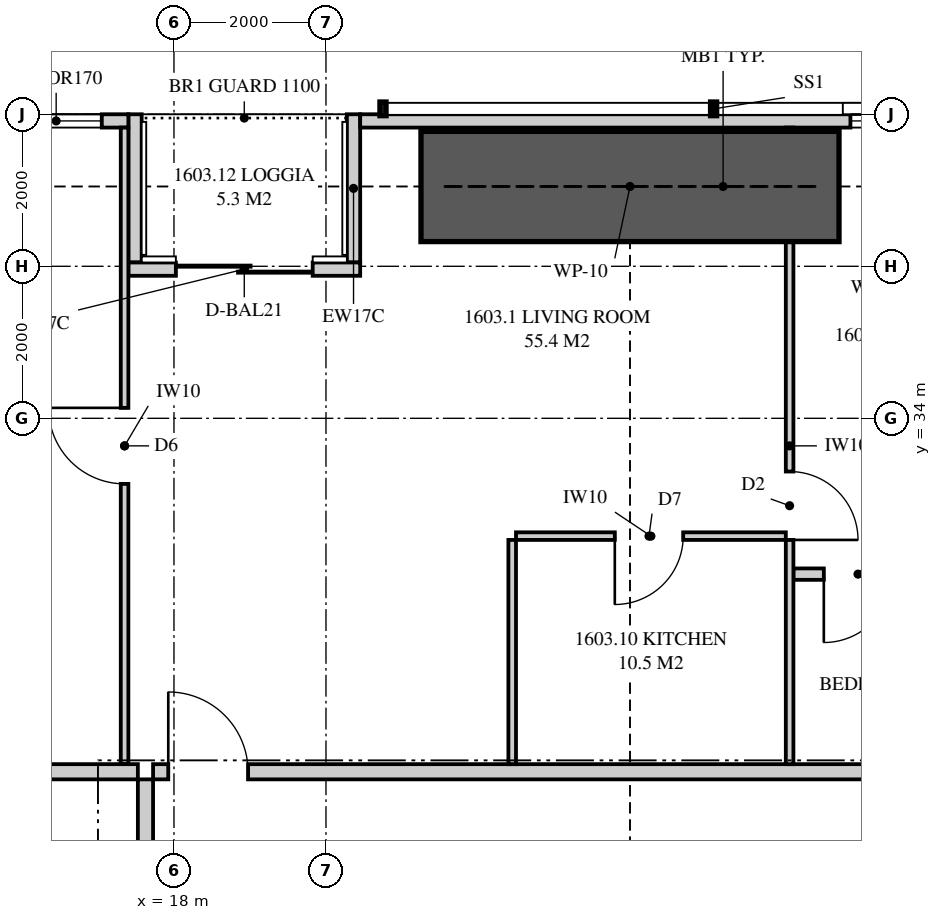
"""IFC4 building model, lengths in metres.
Left out: names, types, materials, properties, quantities, classifications, styles, units other than length and angle.
Written with IfcOpenShell. Run it as: python <this file> out.ifc"""

import sys

from ifc_helpers import new_model, si_unit, direction, frame, frame_2d, origin, place, context, subcontext, project, spatial, polyline, rectangle, outline, extrude, element, fill, save


model = new_model("IFC4")
c1 = context("Model", 3, precision=1e-05, world=origin(), true_north=direction((0.0, 1.0)))
c2 = subcontext(c1, "Body", "Model", "MODEL_VIEW")
j1 = project(units=[si_unit("LENGTHUNIT", "METRE"), si_unit("PLANEANGLEUNIT", "RADIAN")], contexts=[c1])
p1 = place(None, origin())
s1 = spatial("IfcSite", under=j1, at=p1, CompositionType="ELEMENT")
p2 = place(p1, origin())
s2 = spatial("IfcBuilding", under=s1, at=p2, CompositionType="ELEMENT")
p3 = place(p2, frame((0.0, 0.0, 61.2)))
s3 = spatial("IfcBuildingStorey", under=s2, at=p3, CompositionType="ELEMENT", Elevation=61.2)
p4 = place(p3, frame((37.824, 37.913, 0.0), z_axis=(0.0, 0.0, 1.0), x_axis=(-1.0, 0.0, 0.0)))
e1 = element("IfcWall", 1, at=p4, inside=s3, PredefinedType="SOLIDWALL", context=c2, shape_type="SweptSolid", body=[
    extrude(outline(polyline([(0.0, 0.0), (17.374, 0.0), (17.374, 2.15), (2.824, 2.15), (2.824, 3.11), (2.668, 3.11), (2.668, 2.15), (2.62, 2.15), (2.62, 3.11), (0.0, 3.11), (0.0, 0.0)])), frame((0.0, 0.087, 0.0), z_axis=(0.0, -1.0, 0.0), x_axis=(1.0, 0.0, 0.0)), (0.0, 0.0, 1.0), 0.175),
])
p5 = place(p4, frame((5.699, 0.0, 0.4)))
e2 = element("IfcOpeningElement", 2, at=p5, cuts=e1, PredefinedType="OPENING", context=c2, shape_type="SweptSolid", body=[
    extrude(rectangle(XDim=1.8, YDim=1.7, at=frame_2d((0.9, 0.85))), frame((0.0, 0.097, 0.0), z_axis=(0.0, -1.0, 0.0), x_axis=(1.0, 0.0, 0.0)), (0.0, 0.0, 1.0), 0.195),
])
p6 = place(p4, frame((9.124, 0.0, 0.4)))
e3 = element("IfcOpeningElement", 3, at=p6, cuts=e1, PredefinedType="OPENING", context=c2, shape_type="SweptSolid", body=[
    extrude(rectangle(XDim=1.8, YDim=1.7, at=frame_2d((0.9, 0.85))), frame((0.0, 0.097, 0.0), z_axis=(0.0, -1.0, 0.0), x_axis=(1.0, 0.0, 0.0)), (0.0, 0.0, 1.0), 0.195),
])
p7 = place(p3, frame((17.4, 37.913, 0.0), z_axis=(0.0, 0.0, 1.0), x_axis=(-1.0, 0.0, 0.0)))
e4 = element("IfcWall", 4, at=p7, inside=s3, PredefinedType="SOLIDWALL", context=c2, shape_type="SweptSolid", body=[
    extrude(outline(polyline([(0.0, 0.0), (12.349, 0.0), (12.349, 3.11), (4.604, 3.11), (4.604, 2.15), (4.556, 2.15), (4.556, 3.11), (4.4, 3.11), (4.4, 2.15), (0.0, 2.15), (0.0, 0.0)])), frame((0.0, 0.087, 0.0), z_axis=(0.0, -1.0, 0.0), x_axis=(1.0, 0.0, 0.0)), (0.0, 0.0, 1.0), 0.175),
])
p8 = place(p7, frame((0.35, 0.0, 0.4)))
e5 = element("IfcOpeningElement", 5, at=p8, cuts=e4, PredefinedType="OPENING", context=c2, shape_type="SweptSolid", body=[
    extrude(rectangle(XDim=1.2, YDim=1.7, at=frame_2d((0.6, 0.85))), frame((0.0, 0.097, 0.0), z_axis=(0.0, -1.0, 0.0), x_axis=(1.0, 0.0, 0.0)), (0.0, 0.0, 1.0), 0.195),
])
p9 = place(p7, frame((8.3, 0.0, 0.4)))
e6 = element("IfcOpeningElement", 6, at=p9, cuts=e4, PredefinedType="OPENING", context=c2, shape_type="SweptSolid", body=[
    extrude(rectangle(XDim=1.8, YDim=1.7, at=frame_2d((0.9, 0.85))), frame((0.0, 0.097, 0.0), z_axis=(0.0, -1.0, 0.0), x_axis=(1.0, 0.0, 0.0)), (0.0, 0.0, 1.0), 0.195),
])
p10 = place(p3, frame((20.45, 35.962, 0.0), z_axis=(0.0, 0.0, 1.0), x_axis=(-1.0, 0.0, 0.0)))
e7 = element("IfcWall", 7, at=p10, inside=s3, PredefinedType="SOLIDWALL", context=c2, shape_type="SweptSolid", body=[
    extrude(rectangle(XDim=3.05, YDim=0.175, at=frame_2d((1.525, 0.0))), origin(), (0.0, 0.0, 1.0), 3.11),
])
p11 = place(p10, frame((0.625, 0.0, 0.0)))
e8 = element("IfcOpeningElement", 8, at=p11, cuts=e7, PredefinedType="OPENING", context=c2, shape_type="SweptSolid", body=[
    extrude(rectangle(XDim=1.8, YDim=2.1, at=frame_2d((0.9, 1.05))), frame((0.0, 0.097, 0.0), z_axis=(0.0, -1.0, 0.0), x_axis=(1.0, 0.0, 0.0)), (0.0, 0.0, 1.0), 0.195),
])
for number, where, z_axis, x_axis in (
    (9, (20.363, 38.0, 0.0), (0.0, 0.0, 1.0), (0.0, -1.0, 0.0)),
    (10, (17.488, 38.0, 0.0), (0.0, 0.0, 1.0), (0.0, -1.0, 0.0)),
):
    element("IfcWall", number, at=place(p3, frame(where, z_axis=z_axis, x_axis=x_axis)), inside=s3, PredefinedType="SOLIDWALL", context=c2, shape_type="SweptSolid", body=[
        extrude(outline(polyline([(0.0, 0.0), (1.95, 0.0), (1.95, 3.11), (1.75, 3.11), (1.75, 2.15), (0.15, 2.15), (0.15, 3.11), (0.0, 3.11), (0.0, 0.0)])), frame((0.0, 0.087, 0.0), z_axis=(0.0, -1.0, 0.0), x_axis=(1.0, 0.0, 0.0)), (0.0, 0.0, 1.0), 0.175),
    ])
p12 = place(p3, frame((17.725, 29.35, 0.0), z_axis=(0.0, 0.0, 1.0), x_axis=(1.0, 0.0, 0.0)))
e11 = element("IfcWall", 11, at=p12, inside=s3, PredefinedType="PARTITIONING", context=c2, shape_type="SweptSolid", body=[
    extrude(outline(polyline([(0.0, 0.0), (15.275, 0.0), (15.275, 3.11), (6.612, 3.11), (6.612, 2.541), (5.938, 2.541), (5.938, 3.11), (0.0, 3.11), (0.0, 0.0)])), frame((0.0, 0.1, 0.0), z_axis=(0.0, -1.0, 0.0), x_axis=(1.0, 0.0, 0.0)), (0.0, 0.0, 1.0), 0.2),
])
p13 = place(p12, frame((0.2, 0.0, 0.0)))
e12 = element("IfcOpeningElement", 12, at=p13, cuts=e11, PredefinedType="OPENING", context=c2, shape_type="SweptSolid", body=[
    extrude(rectangle(XDim=1.05, YDim=2.2, at=frame_2d((0.525, 1.1))), frame((0.0, 0.11, 0.0), z_axis=(0.0, -1.0, 0.0), x_axis=(1.0, 0.0, 0.0)), (0.0, 0.0, 1.0), 0.22),
])
p14 = place(p3, frame((26.1, 37.825, 0.0), z_axis=(0.0, 0.0, 1.0), x_axis=(0.0, -1.0, 0.0)))
e13 = element("IfcWall", 13, at=p14, inside=s3, PredefinedType="PARTITIONING", context=c2, shape_type="SweptSolid", body=[
    extrude(outline(polyline([(0.529, 2.15), (0.0, 2.15), (0.0, 0.0), (0.529, 0.0), (0.529, 0.034), (1.021, 0.034), (1.021, 0.0), (8.375, 0.0), (8.375, 3.11), (1.635, 3.11), (1.635, 2.15), (1.021, 2.15), (1.021, 2.116), (0.529, 2.116), (0.529, 2.15)])), frame((0.0, 0.05, 0.0), z_axis=(0.0, -1.0, 0.0), x_axis=(1.0, 0.0, 0.0)), (0.0, 0.0, 1.0), 0.1),
])
p15 = place(p14, frame((4.525, 0.0, 0.0)))
e14 = element("IfcOpeningElement", 14, at=p15, cuts=e13, PredefinedType="OPENING", context=c2, shape_type="SweptSolid", body=[
    extrude(rectangle(XDim=0.9, YDim=2.1, at=frame_2d((0.45, 1.05))), frame((0.0, 0.06, 0.0), z_axis=(0.0, -1.0, 0.0), x_axis=(1.0, 0.0, 0.0)), (0.0, 0.0, 1.0), 0.12),
])
p16 = place(p3, frame((26.15, 31.95, 0.0), z_axis=(0.0, 0.0, 1.0), x_axis=(1.0, 0.0, 0.0)))
e15 = element("IfcWall", 15, at=p16, inside=s3, PredefinedType="PLUMBINGWALL", context=c2, shape_type="SweptSolid", body=[
    extrude(rectangle(XDim=3.3, YDim=0.15, at=frame_2d((1.65, 0.0))), origin(), (0.0, 0.0, 1.0), 3.11),
])
p17 = place(p16, frame((0.4, 0.0, 0.0)))
e16 = element("IfcOpeningElement", 16, at=p17, cuts=e15, PredefinedType="OPENING", context=c2, shape_type="SweptSolid", body=[
    extrude(rectangle(XDim=0.9, YDim=2.1, at=frame_2d((0.45, 1.05))), frame((0.0, 0.085, 0.0), z_axis=(0.0, -1.0, 0.0), x_axis=(1.0, 0.0, 0.0)), (0.0, 0.0, 1.0), 0.17),
])
p18 = place(p3, frame((22.5, 32.45, 0.0), z_axis=(0.0, 0.0, 1.0), x_axis=(1.0, 0.0, 0.0)))
e17 = element("IfcWall", 17, at=p18, inside=s3, PredefinedType="PARTITIONING", context=c2, shape_type="SweptSolid", body=[
    extrude(outline(polyline([(0.0, 0.0), (3.55, 0.0), (3.55, 3.11), (1.787, 3.11), (1.787, 2.541), (1.213, 2.541), (1.213, 3.11), (0.0, 3.11), (0.0, 0.0)])), frame((0.0, 0.05, 0.0), z_axis=(0.0, -1.0, 0.0), x_axis=(1.0, 0.0, 0.0)), (0.0, 0.0, 1.0), 0.1),
])
p19 = place(p18, frame((1.3, 0.0, 0.0)))
e18 = element("IfcOpeningElement", 18, at=p19, cuts=e17, PredefinedType="OPENING", context=c2, shape_type="SweptSolid", body=[
    extrude(rectangle(XDim=0.9, YDim=2.1, at=frame_2d((0.45, 1.05))), frame((0.0, 0.06, 0.0), z_axis=(0.0, -1.0, 0.0), x_axis=(1.0, 0.0, 0.0)), (0.0, 0.0, 1.0), 0.12),
])
p20 = place(p3, frame((22.45, 32.4, 0.0), z_axis=(0.0, 0.0, 1.0), x_axis=(0.0, -1.0, 0.0)))
e19 = element("IfcWall", 19, at=p20, inside=s3, PredefinedType="PARTITIONING", context=c2, shape_type="SweptSolid", body=[
    extrude(rectangle(XDim=2.95, YDim=0.1, at=frame_2d((1.475, 0.0))), origin(), (0.0, 0.0, 1.0), 3.11),
])
p21 = place(p3, frame((17.35, 37.825, 0.0), z_axis=(0.0, 0.0, 1.0), x_axis=(0.0, -1.0, 0.0)))
e20 = element("IfcWall", 20, at=p21, inside=s3, PredefinedType="PARTITIONING", context=c2, shape_type="SweptSolid", body=[
    extrude(outline(polyline([(0.0, 0.0), (8.375, 0.0), (8.375, 3.11), (1.635, 3.11), (1.635, 2.15), (0.0, 2.15), (0.0, 3.11), (0.0, 0.0)])), frame((0.0, 0.05, 0.0), z_axis=(0.0, -1.0, 0.0), x_axis=(1.0, 0.0, 0.0)), (0.0, 0.0, 1.0), 0.1),
])
p22 = place(p21, frame((3.688, 0.0, 0.0)))
e21 = element("IfcOpeningElement", 21, at=p22, cuts=e20, PredefinedType="OPENING", context=c2, shape_type="SweptSolid", body=[
    extrude(rectangle(XDim=1.0, YDim=2.1, at=frame_2d((0.5, 1.05))), frame((0.0, 0.06, 0.0), z_axis=(0.0, -1.0, 0.0), x_axis=(1.0, 0.0, 0.0)), (0.0, 0.0, 1.0), 0.12),
])
p23 = place(p3, frame((2.0, 29.35, 0.0), z_axis=(0.0, 0.0, 1.0), x_axis=(1.0, 0.0, 0.0)))
e22 = element("IfcWall", 22, at=p23, inside=s3, PredefinedType="PARTITIONING", context=c2, shape_type="SweptSolid", body=[
    extrude(outline(polyline([(0.0, 0.0), (15.525, 0.0), (15.525, 3.11), (11.337, 3.11), (11.337, 2.541), (10.663, 2.541), (10.663, 3.11), (9.51, 3.11), (9.51, 2.51), (6.89, 2.51), (6.89, 3.11), (2.969, 3.11), (2.969, 2.541), (2.577, 2.541), (2.577, 2.15), (0.733, 2.15), (0.733, 3.11), (0.0, 3.11), (0.0, 0.0)])), frame((0.0, 0.1, 0.0), z_axis=(0.0, -1.0, 0.0), x_axis=(1.0, 0.0, 0.0)), (0.0, 0.0, 1.0), 0.2),
])
p24 = place(p3, frame((17.625, 24.2, 0.0), z_axis=(0.0, 0.0, 1.0), x_axis=(0.0, 1.0, 0.0)))
e23 = element("IfcWall", 23, at=p24, inside=s3, PredefinedType="PARTITIONING", context=c2, shape_type="SweptSolid", body=[
    extrude(outline(polyline([(0.0, 0.0), (5.05, 0.0), (5.05, 3.11), (1.137, 3.11), (1.137, 2.541), (0.463, 2.541), (0.463, 3.11), (0.0, 3.11), (0.0, 0.0)])), frame((0.0, 0.1, 0.0), z_axis=(0.0, -1.0, 0.0), x_axis=(1.0, 0.0, 0.0)), (0.0, 0.0, 1.0), 0.2),
])
p25 = place(p24, frame((1.075, 0.0, 0.0)))
e24 = element("IfcOpeningElement", 24, at=p25, cuts=e23, PredefinedType="OPENING", context=c2, shape_type="SweptSolid", body=[
    extrude(rectangle(XDim=1.8, YDim=2.1, at=frame_2d((0.9, 1.05))), frame((0.0, 0.11, 0.0), z_axis=(0.0, -1.0, 0.0), x_axis=(1.0, 0.0, 0.0)), (0.0, 0.0, 1.0), 0.22),
])
p26 = place(p3, frame((21.25, 37.05, 0.0), z_axis=(0.0, 0.0, 1.0), x_axis=(1.0, 0.0, 0.0)))
e25 = element("IfcWall", 25, at=p26, inside=s3, PredefinedType="SHEAR", context=c2, shape_type="SweptSolid", body=[
    extrude(rectangle(XDim=5.5, YDim=1.45, at=frame_2d((2.75, 0.0))), origin(), (0.0, 0.0, 1.0), 3.35),
])
p27 = place(p6, origin())
e26 = element("IfcWindow", 26, at=p27, inside=s3, PartitioningType="SINGLE_PANEL", PredefinedType="WINDOW", context=c2, shape_type="SweptSolid", body=[
    extrude(rectangle(XDim=1.8, YDim=1.7, at=frame_2d((0.9, 0.85))), frame((0.0, 0.03, 0.0), z_axis=(0.0, -1.0, 0.0), x_axis=(1.0, 0.0, 0.0)), (0.0, 0.0, 1.0), 0.06),
])
fill(e3, e26)
p28 = place(p11, origin())
e27 = element("IfcDoor", 27, at=p28, inside=s3, OperationType="SLIDING_TO_LEFT", PredefinedType="DOOR", context=c2, shape_type="SweptSolid", body=[
    extrude(rectangle(XDim=1.8, YDim=2.1, at=frame_2d((0.9, 1.05))), frame((0.0, 0.025, 0.0), z_axis=(0.0, -1.0, 0.0), x_axis=(1.0, 0.0, 0.0)), (0.0, 0.0, 1.0), 0.05),
])
fill(e8, e27)
p29 = place(p8, origin())
e28 = element("IfcWindow", 28, at=p29, inside=s3, PartitioningType="SINGLE_PANEL", PredefinedType="WINDOW", context=c2, shape_type="SweptSolid", body=[
    extrude(rectangle(XDim=1.2, YDim=1.7, at=frame_2d((0.6, 0.85))), frame((0.0, 0.03, 0.0), z_axis=(0.0, -1.0, 0.0), x_axis=(1.0, 0.0, 0.0)), (0.0, 0.0, 1.0), 0.06),
])
fill(e5, e28)
p30 = place(p13, origin())
e29 = element("IfcDoor", 29, at=p30, inside=s3, OperationType="SINGLE_SWING_LEFT", PredefinedType="DOOR", context=c2, shape_type="SweptSolid", body=[
    extrude(rectangle(XDim=1.05, YDim=2.2, at=frame_2d((0.525, 1.1))), frame((0.0, 0.025, 0.0), z_axis=(0.0, -1.0, 0.0), x_axis=(1.0, 0.0, 0.0)), (0.0, 0.0, 1.0), 0.05),
])
fill(e12, e29)
p31 = place(p15, origin())
e30 = element("IfcDoor", 30, at=p31, inside=s3, OperationType="SINGLE_SWING_RIGHT", PredefinedType="DOOR", context=c2, shape_type="SweptSolid", body=[
    extrude(rectangle(XDim=0.9, YDim=2.1, at=frame_2d((0.45, 1.05))), frame((0.0, 0.025, 0.0), z_axis=(0.0, -1.0, 0.0), x_axis=(1.0, 0.0, 0.0)), (0.0, 0.0, 1.0), 0.05),
])
fill(e14, e30)
p32 = place(p17, frame((0.9, 0.0, 0.0), z_axis=(0.0, 0.0, 1.0), x_axis=(-1.0, 0.0, 0.0)))
e31 = element("IfcDoor", 31, at=p32, inside=s3, OperationType="SINGLE_SWING_RIGHT", PredefinedType="DOOR", context=c2, shape_type="SweptSolid", body=[
    extrude(rectangle(XDim=0.9, YDim=2.1, at=frame_2d((0.45, 1.05))), frame((0.0, 0.025, 0.0), z_axis=(0.0, -1.0, 0.0), x_axis=(1.0, 0.0, 0.0)), (0.0, 0.0, 1.0), 0.05),
])
fill(e16, e31)
p33 = place(p19, frame((0.9, 0.0, 0.0), z_axis=(0.0, 0.0, 1.0), x_axis=(-1.0, 0.0, 0.0)))
e32 = element("IfcDoor", 32, at=p33, inside=s3, OperationType="SINGLE_SWING_RIGHT", PredefinedType="DOOR", context=c2, shape_type="SweptSolid", body=[
    extrude(rectangle(XDim=0.9, YDim=2.1, at=frame_2d((0.45, 1.05))), frame((0.0, 0.025, 0.0), z_axis=(0.0, -1.0, 0.0), x_axis=(1.0, 0.0, 0.0)), (0.0, 0.0, 1.0), 0.05),
])
fill(e18, e32)
p34 = place(p22, frame((1.0, 0.0, 0.0), z_axis=(0.0, 0.0, 1.0), x_axis=(-1.0, 0.0, 0.0)))
e33 = element("IfcDoor", 33, at=p34, inside=s3, OperationType="SINGLE_SWING_RIGHT", PredefinedType="DOOR", context=c2, shape_type="SweptSolid", body=[
    extrude(rectangle(XDim=1.0, YDim=2.1, at=frame_2d((0.5, 1.05))), frame((0.0, 0.025, 0.0), z_axis=(0.0, -1.0, 0.0), x_axis=(1.0, 0.0, 0.0)), (0.0, 0.0, 1.0), 0.05),
])
fill(e21, e33)
save(model, sys.argv[1])
